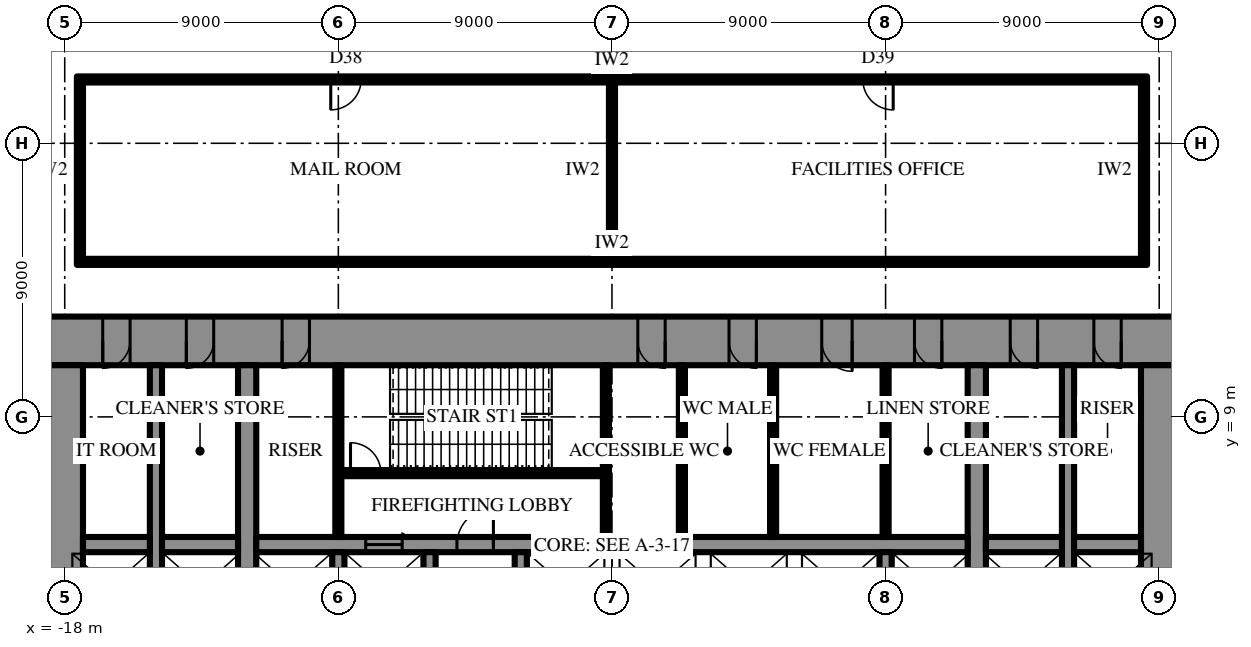
"""IFC4 building model, lengths in metres.
Left out: names, types, materials, properties, quantities, classifications, styles, units other than length and angle.
Written with IfcOpenShell. Run it as: python <this file> out.ifc"""

import sys

from ifc_helpers import new_model, si_unit, direction, frame, frame_2d, origin, place, context, subcontext, project, spatial, rectangle, extrude, element, fill, save


model = new_model("IFC4")
c1 = context("Model", 3, precision=1e-05, world=origin(), true_north=direction((0.0, 1.0)))
c2 = subcontext(c1, "Body", "Model", "MODEL_VIEW")
j1 = project(units=[si_unit("LENGTHUNIT", "METRE"), si_unit("PLANEANGLEUNIT", "RADIAN")], contexts=[c1])
p1 = place(None, origin())
s1 = spatial("IfcSite", under=j1, at=p1, CompositionType="ELEMENT")
p2 = place(p1, origin())
s2 = spatial("IfcBuilding", under=s1, at=p2, CompositionType="ELEMENT")
p3 = place(p2, origin())
s3 = spatial("IfcBuildingStorey", under=s2, at=p3, CompositionType="ELEMENT", Elevation=0.0)
p4 = place(p3, frame((-18.6, 11.5, 0.0), z_axis=(0.0, 0.0, 1.0), x_axis=(1.0, 0.0, 0.0)))
e1 = element("IfcWall", 1, at=p4, inside=s3, PredefinedType="SHEAR", context=c2, shape_type="SweptSolid", body=[
    extrude(rectangle(XDim=37.2, YDim=1.6, at=frame_2d((18.6, 0.0))), origin(), (0.0, 0.0, 1.0), 7.0),
])
p5 = place(p4, frame((19.45, 0.0, 0.0)))
e2 = element("IfcOpeningElement", 2, at=p5, cuts=e1, PredefinedType="OPENING", context=c2, shape_type="SweptSolid", body=[
    extrude(rectangle(XDim=0.9, YDim=2.2, at=frame_2d((0.45, 1.1))), frame((0.0, 0.81, 0.0), z_axis=(0.0, -1.0, 0.0), x_axis=(1.0, 0.0, 0.0)), (0.0, 0.0, 1.0), 1.62),
])
p6 = place(p4, frame((22.45, 0.0, 0.0)))
e3 = element("IfcOpeningElement", 3, at=p6, cuts=e1, PredefinedType="OPENING", context=c2, shape_type="SweptSolid", body=[
    extrude(rectangle(XDim=0.9, YDim=2.2, at=frame_2d((0.45, 1.1))), frame((0.0, 0.81, 0.0), z_axis=(0.0, -1.0, 0.0), x_axis=(1.0, 0.0, 0.0)), (0.0, 0.0, 1.0), 1.62),
])
p7 = place(p4, frame((25.5, 0.0, 0.0)))
e4 = element("IfcOpeningElement", 4, at=p7, cuts=e1, PredefinedType="OPENING", context=c2, shape_type="SweptSolid", body=[
    extrude(rectangle(XDim=1.0, YDim=2.2, at=frame_2d((0.5, 1.1))), frame((0.0, 0.81, 0.0), z_axis=(0.0, -1.0, 0.0), x_axis=(1.0, 0.0, 0.0)), (0.0, 0.0, 1.0), 1.62),
])
p8 = place(p4, frame((1.85, 0.0, 0.0)))
e5 = element("IfcOpeningElement", 5, at=p8, cuts=e1, PredefinedType="OPENING", context=c2, shape_type="SweptSolid", body=[
    extrude(rectangle(XDim=0.9, YDim=2.2, at=frame_2d((0.45, 1.1))), frame((0.0, 0.81, 0.0), z_axis=(0.0, -1.0, 0.0), x_axis=(1.0, 0.0, 0.0)), (0.0, 0.0, 1.0), 1.62),
])
p9 = place(p4, frame((4.6, 0.0, 0.0)))
e6 = element("IfcOpeningElement", 6, at=p9, cuts=e1, PredefinedType="OPENING", context=c2, shape_type="SweptSolid", body=[
    extrude(rectangle(XDim=0.9, YDim=2.2, at=frame_2d((0.45, 1.1))), frame((0.0, 0.81, 0.0), z_axis=(0.0, -1.0, 0.0), x_axis=(1.0, 0.0, 0.0)), (0.0, 0.0, 1.0), 1.62),
])
p10 = place(p4, frame((7.75, 0.0, 0.0)))
e7 = element("IfcOpeningElement", 7, at=p10, cuts=e1, PredefinedType="OPENING", context=c2, shape_type="SweptSolid", body=[
    extrude(rectangle(XDim=0.9, YDim=2.2, at=frame_2d((0.45, 1.1))), frame((0.0, 0.81, 0.0), z_axis=(0.0, -1.0, 0.0), x_axis=(1.0, 0.0, 0.0)), (0.0, 0.0, 1.0), 1.62),
])
p11 = place(p4, frame((28.55, 0.0, 0.0)))
e8 = element("IfcOpeningElement", 8, at=p11, cuts=e1, PredefinedType="OPENING", context=c2, shape_type="SweptSolid", body=[
    extrude(rectangle(XDim=0.9, YDim=2.2, at=frame_2d((0.45, 1.1))), frame((0.0, 0.81, 0.0), z_axis=(0.0, -1.0, 0.0), x_axis=(1.0, 0.0, 0.0)), (0.0, 0.0, 1.0), 1.62),
])
p12 = place(p4, frame((31.7, 0.0, 0.0)))
e9 = element("IfcOpeningElement", 9, at=p12, cuts=e1, PredefinedType="OPENING", context=c2, shape_type="SweptSolid", body=[
    extrude(rectangle(XDim=0.9, YDim=2.2, at=frame_2d((0.45, 1.1))), frame((0.0, 0.81, 0.0), z_axis=(0.0, -1.0, 0.0), x_axis=(1.0, 0.0, 0.0)), (0.0, 0.0, 1.0), 1.62),
])
p13 = place(p4, frame((34.45, 0.0, 0.0)))
e10 = element("IfcOpeningElement", 10, at=p13, cuts=e1, PredefinedType="OPENING", context=c2, shape_type="SweptSolid", body=[
    extrude(rectangle(XDim=0.9, YDim=2.2, at=frame_2d((0.45, 1.1))), frame((0.0, 0.81, 0.0), z_axis=(0.0, -1.0, 0.0), x_axis=(1.0, 0.0, 0.0)), (0.0, 0.0, 1.0), 1.62),
])
p14 = place(p3, frame((18.0, -10.7, 0.0), z_axis=(0.0, 0.0, 1.0), x_axis=(0.0, 1.0, 0.0)))
e11 = element("IfcWall", 11, at=p14, inside=s3, PredefinedType="SHEAR", context=c2, shape_type="SweptSolid", body=[
    extrude(rectangle(XDim=21.4, YDim=1.2, at=frame_2d((10.7, 0.0))), origin(), (0.0, 0.0, 1.0), 7.0),
])
p15 = place(p14, frame((9.8, 0.0, 0.0)))
e12 = element("IfcOpeningElement", 12, at=p15, cuts=e11, PredefinedType="OPENING", context=c2, shape_type="SweptSolid", body=[
    extrude(rectangle(XDim=1.8, YDim=2.4, at=frame_2d((0.9, 1.2))), frame((0.0, 0.61, 0.0), z_axis=(0.0, -1.0, 0.0), x_axis=(1.0, 0.0, 0.0)), (0.0, 0.0, 1.0), 1.22),
])
p16 = place(p3, frame((-18.0, 10.7, 0.0), z_axis=(0.0, 0.0, 1.0), x_axis=(0.0, -1.0, 0.0)))
e13 = element("IfcWall", 13, at=p16, inside=s3, PredefinedType="SHEAR", context=c2, shape_type="SweptSolid", body=[
    extrude(rectangle(XDim=21.4, YDim=1.2, at=frame_2d((10.7, 0.0))), origin(), (0.0, 0.0, 1.0), 7.0),
])
p17 = place(p16, frame((9.8, 0.0, 0.0)))
e14 = element("IfcOpeningElement", 14, at=p17, cuts=e13, PredefinedType="OPENING", context=c2, shape_type="SweptSolid", body=[
    extrude(rectangle(XDim=1.8, YDim=2.4, at=frame_2d((0.9, 1.2))), frame((0.0, 0.61, 0.0), z_axis=(0.0, -1.0, 0.0), x_axis=(1.0, 0.0, 0.0)), (0.0, 0.0, 1.0), 1.22),
])
p18 = place(p3, frame((12.0, -10.7, 0.0), z_axis=(0.0, 0.0, 1.0), x_axis=(0.0, 1.0, 0.0)))
e15 = element("IfcWall", 15, at=p18, inside=s3, PredefinedType="SHEAR", context=c2, shape_type="SweptSolid", body=[
    extrude(rectangle(XDim=21.4, YDim=0.6, at=frame_2d((10.7, 0.0))), origin(), (0.0, 0.0, 1.0), 7.0),
])
p19 = place(p18, frame((9.8, 0.0, 0.0)))
e16 = element("IfcOpeningElement", 16, at=p19, cuts=e15, PredefinedType="OPENING", context=c2, shape_type="SweptSolid", body=[
    extrude(rectangle(XDim=1.8, YDim=2.4, at=frame_2d((0.9, 1.2))), frame((0.0, 0.31, 0.0), z_axis=(0.0, -1.0, 0.0), x_axis=(1.0, 0.0, 0.0)), (0.0, 0.0, 1.0), 0.62),
])
p20 = place(p3, frame((-12.0, -10.7, 0.0), z_axis=(0.0, 0.0, 1.0), x_axis=(0.0, 1.0, 0.0)))
e17 = element("IfcWall", 17, at=p20, inside=s3, PredefinedType="SHEAR", context=c2, shape_type="SweptSolid", body=[
    extrude(rectangle(XDim=21.4, YDim=0.6, at=frame_2d((10.7, 0.0))), origin(), (0.0, 0.0, 1.0), 7.0),
])
p21 = place(p20, frame((9.8, 0.0, 0.0)))
e18 = element("IfcOpeningElement", 18, at=p21, cuts=e17, PredefinedType="OPENING", context=c2, shape_type="SweptSolid", body=[
    extrude(rectangle(XDim=1.8, YDim=2.4, at=frame_2d((0.9, 1.2))), frame((0.0, 0.31, 0.0), z_axis=(0.0, -1.0, 0.0), x_axis=(1.0, 0.0, 0.0)), (0.0, 0.0, 1.0), 0.62),
])
p22 = place(p3, frame((15.0, -10.7, 0.0), z_axis=(0.0, 0.0, 1.0), x_axis=(0.0, 1.0, 0.0)))
e19 = element("IfcWall", 19, at=p22, inside=s3, PredefinedType="SHEAR", context=c2, shape_type="SweptSolid", body=[
    extrude(rectangle(XDim=21.4, YDim=0.4, at=frame_2d((10.7, 0.0))), origin(), (0.0, 0.0, 1.0), 7.0),
])
p23 = place(p22, frame((9.8, 0.0, 0.0)))
e20 = element("IfcOpeningElement", 20, at=p23, cuts=e19, PredefinedType="OPENING", context=c2, shape_type="SweptSolid", body=[
    extrude(rectangle(XDim=1.8, YDim=2.4, at=frame_2d((0.9, 1.2))), frame((0.0, 0.21, 0.0), z_axis=(0.0, -1.0, 0.0), x_axis=(1.0, 0.0, 0.0)), (0.0, 0.0, 1.0), 0.42),
])
p24 = place(p3, frame((-15.0, -10.7, 0.0), z_axis=(0.0, 0.0, 1.0), x_axis=(0.0, 1.0, 0.0)))
e21 = element("IfcWall", 21, at=p24, inside=s3, PredefinedType="SHEAR", context=c2, shape_type="SweptSolid", body=[
    extrude(rectangle(XDim=21.4, YDim=0.4, at=frame_2d((10.7, 0.0))), origin(), (0.0, 0.0, 1.0), 7.0),
])
p25 = place(p24, frame((9.8, 0.0, 0.0)))
e22 = element("IfcOpeningElement", 22, at=p25, cuts=e21, PredefinedType="OPENING", context=c2, shape_type="SweptSolid", body=[
    extrude(rectangle(XDim=1.8, YDim=2.4, at=frame_2d((0.9, 1.2))), frame((0.0, 0.21, 0.0), z_axis=(0.0, -1.0, 0.0), x_axis=(1.0, 0.0, 0.0)), (0.0, 0.0, 1.0), 0.42),
])
p26 = place(p3, frame((-17.4, 4.8, 0.0), z_axis=(0.0, 0.0, 1.0), x_axis=(1.0, 0.0, 0.0)))
e23 = element("IfcWall", 23, at=p26, inside=s3, PredefinedType="SHEAR", context=c2, shape_type="SweptSolid", body=[
    extrude(rectangle(XDim=2.2, YDim=0.5, at=frame_2d((1.1, 0.0))), origin(), (0.0, 0.0, 1.0), 7.0),
])
p27 = place(p3, frame((-14.8, 4.8, 0.0), z_axis=(0.0, 0.0, 1.0), x_axis=(1.0, 0.0, 0.0)))
e24 = element("IfcWall", 24, at=p27, inside=s3, PredefinedType="SHEAR", context=c2, shape_type="SweptSolid", body=[
    extrude(rectangle(XDim=2.5, YDim=0.5, at=frame_2d((1.25, 0.0))), origin(), (0.0, 0.0, 1.0), 7.0),
])
p28 = place(p3, frame((-11.7, 4.8, 0.0), z_axis=(0.0, 0.0, 1.0), x_axis=(1.0, 0.0, 0.0)))
e25 = element("IfcWall", 25, at=p28, inside=s3, PredefinedType="SHEAR", context=c2, shape_type="SweptSolid", body=[
    extrude(rectangle(XDim=23.4, YDim=0.5, at=frame_2d((11.7, 0.0))), origin(), (0.0, 0.0, 1.0), 7.0),
])
p29 = place(p28, frame((6.6, 0.0, 0.0)))
e26 = element("IfcOpeningElement", 26, at=p29, cuts=e25, PredefinedType="OPENING", context=c2, shape_type="SweptSolid", body=[
    extrude(rectangle(XDim=1.2, YDim=2.2, at=frame_2d((0.6, 1.1))), frame((0.0, 0.26, 0.0), z_axis=(0.0, -1.0, 0.0), x_axis=(1.0, 0.0, 0.0)), (0.0, 0.0, 1.0), 0.52),
])
p30 = place(p28, frame((3.6, 0.0, 0.0)))
e27 = element("IfcOpeningElement", 27, at=p30, cuts=e25, PredefinedType="OPENING", context=c2, shape_type="SweptSolid", body=[
    extrude(rectangle(XDim=1.2, YDim=2.2, at=frame_2d((0.6, 1.1))), frame((0.0, 0.26, 0.0), z_axis=(0.0, -1.0, 0.0), x_axis=(1.0, 0.0, 0.0)), (0.0, 0.0, 1.0), 0.52),
])
p31 = place(p3, frame((12.3, 4.8, 0.0), z_axis=(0.0, 0.0, 1.0), x_axis=(1.0, 0.0, 0.0)))
e28 = element("IfcWall", 28, at=p31, inside=s3, PredefinedType="SHEAR", context=c2, shape_type="SweptSolid", body=[
    extrude(rectangle(XDim=2.5, YDim=0.5, at=frame_2d((1.25, 0.0))), origin(), (0.0, 0.0, 1.0), 7.0),
])
p32 = place(p3, frame((15.2, 4.8, 0.0), z_axis=(0.0, 0.0, 1.0), x_axis=(1.0, 0.0, 0.0)))
e29 = element("IfcWall", 29, at=p32, inside=s3, PredefinedType="SHEAR", context=c2, shape_type="SweptSolid", body=[
    extrude(rectangle(XDim=2.2, YDim=0.5, at=frame_2d((1.1, 0.0))), origin(), (0.0, 0.0, 1.0), 7.0),
])
for number, where, z_axis, x_axis in (
    (30, (-9.0, 2.25, 0.0), (0.0, 0.0, 1.0), (0.0, 1.0, 0.0)),
    (31, (-6.0, 2.25, 0.0), (0.0, 0.0, 1.0), (0.0, 1.0, 0.0)),
    (32, (-3.0, 2.25, 0.0), (0.0, 0.0, 1.0), (0.0, 1.0, 0.0)),
    (33, (9.0, 2.25, 0.0), (0.0, 0.0, 1.0), (0.0, 1.0, 0.0)),
):
    element("IfcWall", number, at=place(p3, frame(where, z_axis=z_axis, x_axis=x_axis)), inside=s3, PredefinedType="SHEAR", context=c2, shape_type="SweptSolid", body=[
        extrude(rectangle(XDim=2.3, YDim=0.4, at=frame_2d((1.15, 0.0))), origin(), (0.0, 0.0, 1.0), 7.0),
    ])
p33 = place(p3, frame((-0.2, 5.05, 0.0), z_axis=(0.0, 0.0, 1.0), x_axis=(0.0, 1.0, 0.0)))
e34 = element("IfcWall", 34, at=p33, inside=s3, PredefinedType="SHEAR", context=c2, shape_type="SweptSolid", body=[
    extrude(rectangle(XDim=5.65, YDim=0.2, at=frame_2d((2.825, 0.0))), origin(), (0.0, 0.0, 1.0), 7.0),
])
p34 = place(p3, frame((-8.9, 7.15, 0.0), z_axis=(0.0, 0.0, 1.0), x_axis=(1.0, 0.0, 0.0)))
e35 = element("IfcWall", 35, at=p34, inside=s3, PredefinedType="SHEAR", context=c2, shape_type="SweptSolid", body=[
    extrude(rectangle(XDim=8.6, YDim=0.2, at=frame_2d((4.3, 0.0))), origin(), (0.0, 0.0, 1.0), 7.0),
])
p35 = place(p34, frame((0.3, 0.0, 0.0)))
e36 = element("IfcOpeningElement", 36, at=p35, cuts=e35, PredefinedType="OPENING", context=c2, shape_type="SweptSolid", body=[
    extrude(rectangle(XDim=1.0, YDim=2.2, at=frame_2d((0.5, 1.1))), frame((0.0, 0.11, 0.0), z_axis=(0.0, -1.0, 0.0), x_axis=(1.0, 0.0, 0.0)), (0.0, 0.0, 1.0), 0.22),
])
for number, where, z_axis, x_axis in (
    (37, (-9.0, 5.05, 0.0), (0.0, 0.0, 1.0), (0.0, 1.0, 0.0)),
    (38, (9.0, 5.05, 0.0), (0.0, 0.0, 1.0), (0.0, 1.0, 0.0)),
    (39, (2.3, 5.05, 0.0), (0.0, 0.0, 1.0), (0.0, 1.0, 0.0)),
    (40, (5.3, 5.05, 0.0), (0.0, 0.0, 1.0), (0.0, 1.0, 0.0)),
):
    element("IfcWall", number, at=place(p3, frame(where, z_axis=z_axis, x_axis=x_axis)), inside=s3, PredefinedType="PARTITIONING", context=c2, shape_type="SweptSolid", body=[
        extrude(rectangle(XDim=5.65, YDim=0.2, at=frame_2d((2.825, 0.0))), origin(), (0.0, 0.0, 1.0), 6.65),
    ])
p36 = place(p3, frame((-17.6, 14.1, 0.0), z_axis=(0.0, 0.0, 1.0), x_axis=(1.0, 0.0, 0.0)))
e41 = element("IfcWall", 41, at=p36, inside=s3, PredefinedType="PARTITIONING", context=c2, shape_type="SweptSolid", body=[
    extrude(rectangle(XDim=35.2, YDim=0.2, at=frame_2d((17.6, 0.0))), origin(), (0.0, 0.0, 1.0), 6.65),
])
p37 = place(p3, frame((-17.5, 14.2, 0.0), z_axis=(0.0, 0.0, 1.0), x_axis=(0.0, 1.0, 0.0)))
e42 = element("IfcWall", 42, at=p37, inside=s3, PredefinedType="PARTITIONING", context=c2, shape_type="SweptSolid", body=[
    extrude(rectangle(XDim=5.8, YDim=0.2, at=frame_2d((2.9, 0.0))), origin(), (0.0, 0.0, 1.0), 6.65),
])
p38 = place(p3, frame((0.0, 14.2, 0.0), z_axis=(0.0, 0.0, 1.0), x_axis=(0.0, 1.0, 0.0)))
e43 = element("IfcWall", 43, at=p38, inside=s3, PredefinedType="PARTITIONING", context=c2, shape_type="SweptSolid", body=[
    extrude(rectangle(XDim=5.8, YDim=0.2, at=frame_2d((2.9, 0.0))), origin(), (0.0, 0.0, 1.0), 5.594),
])
p39 = place(p3, frame((17.5, 14.2, 0.0), z_axis=(0.0, 0.0, 1.0), x_axis=(0.0, 1.0, 0.0)))
e44 = element("IfcWall", 44, at=p39, inside=s3, PredefinedType="PARTITIONING", context=c2, shape_type="SweptSolid", body=[
    extrude(rectangle(XDim=5.8, YDim=0.2, at=frame_2d((2.9, 0.0))), origin(), (0.0, 0.0, 1.0), 6.65),
])
p40 = place(p3, frame((-17.6, 20.1, 0.0), z_axis=(0.0, 0.0, 1.0), x_axis=(1.0, 0.0, 0.0)))
e45 = element("IfcWall", 45, at=p40, inside=s3, PredefinedType="PARTITIONING", context=c2, shape_type="SweptSolid", body=[
    extrude(rectangle(XDim=35.2, YDim=0.2, at=frame_2d((17.6, 0.0))), origin(), (0.0, 0.0, 1.0), 6.65),
])
p41 = place(p40, frame((8.35, 0.0, 0.0)))
e46 = element("IfcOpeningElement", 46, at=p41, cuts=e45, PredefinedType="OPENING", context=c2, shape_type="SweptSolid", body=[
    extrude(rectangle(XDim=1.0, YDim=2.2, at=frame_2d((0.5, 1.1))), frame((0.0, 0.11, 0.0), z_axis=(0.0, -1.0, 0.0), x_axis=(1.0, 0.0, 0.0)), (0.0, 0.0, 1.0), 0.22),
])
p42 = place(p40, frame((25.85, 0.0, 0.0)))
e47 = element("IfcOpeningElement", 47, at=p42, cuts=e45, PredefinedType="OPENING", context=c2, shape_type="SweptSolid", body=[
    extrude(rectangle(XDim=1.0, YDim=2.2, at=frame_2d((0.5, 1.1))), frame((0.0, 0.11, 0.0), z_axis=(0.0, -1.0, 0.0), x_axis=(1.0, 0.0, 0.0)), (0.0, 0.0, 1.0), 0.22),
])
p43 = place(p29, origin())
e48 = element("IfcDoor", 48, at=p43, inside=s3, OperationType="SINGLE_SWING_LEFT", PredefinedType="DOOR", context=c2, shape_type="SweptSolid", body=[
    extrude(rectangle(XDim=1.2, YDim=2.2, at=frame_2d((0.6, 1.1))), frame((0.0, 0.025, 0.0), z_axis=(0.0, -1.0, 0.0), x_axis=(1.0, 0.0, 0.0)), (0.0, 0.0, 1.0), 0.05),
])
fill(e26, e48)
p44 = place(p35, origin())
e49 = element("IfcDoor", 49, at=p44, inside=s3, OperationType="SINGLE_SWING_RIGHT", PredefinedType="DOOR", context=c2, shape_type="SweptSolid", body=[
    extrude(rectangle(XDim=1.0, YDim=2.2, at=frame_2d((0.5, 1.1))), frame((0.0, 0.025, 0.0), z_axis=(0.0, -1.0, 0.0), x_axis=(1.0, 0.0, 0.0)), (0.0, 0.0, 1.0), 0.05),
])
fill(e36, e49)
p45 = place(p5, frame((0.9, 0.0, 0.0), z_axis=(0.0, 0.0, 1.0), x_axis=(-1.0, 0.0, 0.0)))
e50 = element("IfcDoor", 50, at=p45, inside=s3, OperationType="SINGLE_SWING_RIGHT", PredefinedType="DOOR", context=c2, shape_type="SweptSolid", body=[
    extrude(rectangle(XDim=0.9, YDim=2.2, at=frame_2d((0.45, 1.1))), frame((0.0, 0.025, 0.0), z_axis=(0.0, -1.0, 0.0), x_axis=(1.0, 0.0, 0.0)), (0.0, 0.0, 1.0), 0.05),
])
fill(e2, e50)
p46 = place(p6, frame((0.9, 0.0, 0.0), z_axis=(0.0, 0.0, 1.0), x_axis=(-1.0, 0.0, 0.0)))
e51 = element("IfcDoor", 51, at=p46, inside=s3, OperationType="SINGLE_SWING_RIGHT", PredefinedType="DOOR", context=c2, shape_type="SweptSolid", body=[
    extrude(rectangle(XDim=0.9, YDim=2.2, at=frame_2d((0.45, 1.1))), frame((0.0, 0.025, 0.0), z_axis=(0.0, -1.0, 0.0), x_axis=(1.0, 0.0, 0.0)), (0.0, 0.0, 1.0), 0.05),
])
fill(e3, e51)
p47 = place(p7, frame((1.0, 0.0, 0.0), z_axis=(0.0, 0.0, 1.0), x_axis=(-1.0, 0.0, 0.0)))
e52 = element("IfcDoor", 52, at=p47, inside=s3, OperationType="SINGLE_SWING_RIGHT", PredefinedType="DOOR", context=c2, shape_type="SweptSolid", body=[
    extrude(rectangle(XDim=1.0, YDim=2.2, at=frame_2d((0.5, 1.1))), frame((0.0, 0.025, 0.0), z_axis=(0.0, -1.0, 0.0), x_axis=(1.0, 0.0, 0.0)), (0.0, 0.0, 1.0), 0.05),
])
fill(e4, e52)
p48 = place(p8, frame((0.9, 0.0, 0.0), z_axis=(0.0, 0.0, 1.0), x_axis=(-1.0, 0.0, 0.0)))
e53 = element("IfcDoor", 53, at=p48, inside=s3, OperationType="SINGLE_SWING_LEFT", PredefinedType="DOOR", context=c2, shape_type="SweptSolid", body=[
    extrude(rectangle(XDim=0.9, YDim=2.2, at=frame_2d((0.45, 1.1))), frame((0.0, 0.025, 0.0), z_axis=(0.0, -1.0, 0.0), x_axis=(1.0, 0.0, 0.0)), (0.0, 0.0, 1.0), 0.05),
])
fill(e5, e53)
p49 = place(p9, frame((0.9, 0.0, 0.0), z_axis=(0.0, 0.0, 1.0), x_axis=(-1.0, 0.0, 0.0)))
e54 = element("IfcDoor", 54, at=p49, inside=s3, OperationType="SINGLE_SWING_LEFT", PredefinedType="DOOR", context=c2, shape_type="SweptSolid", body=[
    extrude(rectangle(XDim=0.9, YDim=2.2, at=frame_2d((0.45, 1.1))), frame((0.0, 0.025, 0.0), z_axis=(0.0, -1.0, 0.0), x_axis=(1.0, 0.0, 0.0)), (0.0, 0.0, 1.0), 0.05),
])
fill(e6, e54)
p50 = place(p10, frame((0.9, 0.0, 0.0), z_axis=(0.0, 0.0, 1.0), x_axis=(-1.0, 0.0, 0.0)))
e55 = element("IfcDoor", 55, at=p50, inside=s3, OperationType="SINGLE_SWING_LEFT", PredefinedType="DOOR", context=c2, shape_type="SweptSolid", body=[
    extrude(rectangle(XDim=0.9, YDim=2.2, at=frame_2d((0.45, 1.1))), frame((0.0, 0.025, 0.0), z_axis=(0.0, -1.0, 0.0), x_axis=(1.0, 0.0, 0.0)), (0.0, 0.0, 1.0), 0.05),
])
fill(e7, e55)
p51 = place(p11, frame((0.9, 0.0, 0.0), z_axis=(0.0, 0.0, 1.0), x_axis=(-1.0, 0.0, 0.0)))
e56 = element("IfcDoor", 56, at=p51, inside=s3, OperationType="SINGLE_SWING_RIGHT", PredefinedType="DOOR", context=c2, shape_type="SweptSolid", body=[
    extrude(rectangle(XDim=0.9, YDim=2.2, at=frame_2d((0.45, 1.1))), frame((0.0, 0.025, 0.0), z_axis=(0.0, -1.0, 0.0), x_axis=(1.0, 0.0, 0.0)), (0.0, 0.0, 1.0), 0.05),
])
fill(e8, e56)
p52 = place(p12, frame((0.9, 0.0, 0.0), z_axis=(0.0, 0.0, 1.0), x_axis=(-1.0, 0.0, 0.0)))
e57 = element("IfcDoor", 57, at=p52, inside=s3, OperationType="SINGLE_SWING_RIGHT", PredefinedType="DOOR", context=c2, shape_type="SweptSolid", body=[
    extrude(rectangle(XDim=0.9, YDim=2.2, at=frame_2d((0.45, 1.1))), frame((0.0, 0.025, 0.0), z_axis=(0.0, -1.0, 0.0), x_axis=(1.0, 0.0, 0.0)), (0.0, 0.0, 1.0), 0.05),
])
fill(e9, e57)
p53 = place(p13, frame((0.9, 0.0, 0.0), z_axis=(0.0, 0.0, 1.0), x_axis=(-1.0, 0.0, 0.0)))
e58 = element("IfcDoor", 58, at=p53, inside=s3, OperationType="SINGLE_SWING_RIGHT", PredefinedType="DOOR", context=c2, shape_type="SweptSolid", body=[
    extrude(rectangle(XDim=0.9, YDim=2.2, at=frame_2d((0.45, 1.1))), frame((0.0, 0.025, 0.0), z_axis=(0.0, -1.0, 0.0), x_axis=(1.0, 0.0, 0.0)), (0.0, 0.0, 1.0), 0.05),
])
fill(e10, e58)
p54 = place(p30, origin())
e59 = element("IfcDoor", 59, at=p54, inside=s3, OperationType="SLIDING_TO_LEFT", PredefinedType="DOOR", context=c2, shape_type="SweptSolid", body=[
    extrude(rectangle(XDim=1.2, YDim=2.2, at=frame_2d((0.6, 1.1))), frame((0.0, 0.025, 0.0), z_axis=(0.0, -1.0, 0.0), x_axis=(1.0, 0.0, 0.0)), (0.0, 0.0, 1.0), 0.05),
])
fill(e27, e59)
p55 = place(p41, frame((1.0, 0.0, 0.0), z_axis=(0.0, 0.0, 1.0), x_axis=(-1.0, 0.0, 0.0)))
e60 = element("IfcDoor", 60, at=p55, inside=s3, OperationType="SINGLE_SWING_LEFT", PredefinedType="DOOR", context=c2, shape_type="SweptSolid", body=[
    extrude(rectangle(XDim=1.0, YDim=2.2, at=frame_2d((0.5, 1.1))), frame((0.0, 0.025, 0.0), z_axis=(0.0, -1.0, 0.0), x_axis=(1.0, 0.0, 0.0)), (0.0, 0.0, 1.0), 0.05),
])
fill(e46, e60)
p56 = place(p42, frame((1.0, 0.0, 0.0), z_axis=(0.0, 0.0, 1.0), x_axis=(-1.0, 0.0, 0.0)))
e61 = element("IfcDoor", 61, at=p56, inside=s3, OperationType="SINGLE_SWING_RIGHT", PredefinedType="DOOR", context=c2, shape_type="SweptSolid", body=[
    extrude(rectangle(XDim=1.0, YDim=2.2, at=frame_2d((0.5, 1.1))), frame((0.0, 0.025, 0.0), z_axis=(0.0, -1.0, 0.0), x_axis=(1.0, 0.0, 0.0)), (0.0, 0.0, 1.0), 0.05),
])
fill(e47, e61)
save(model, sys.argv[1])
